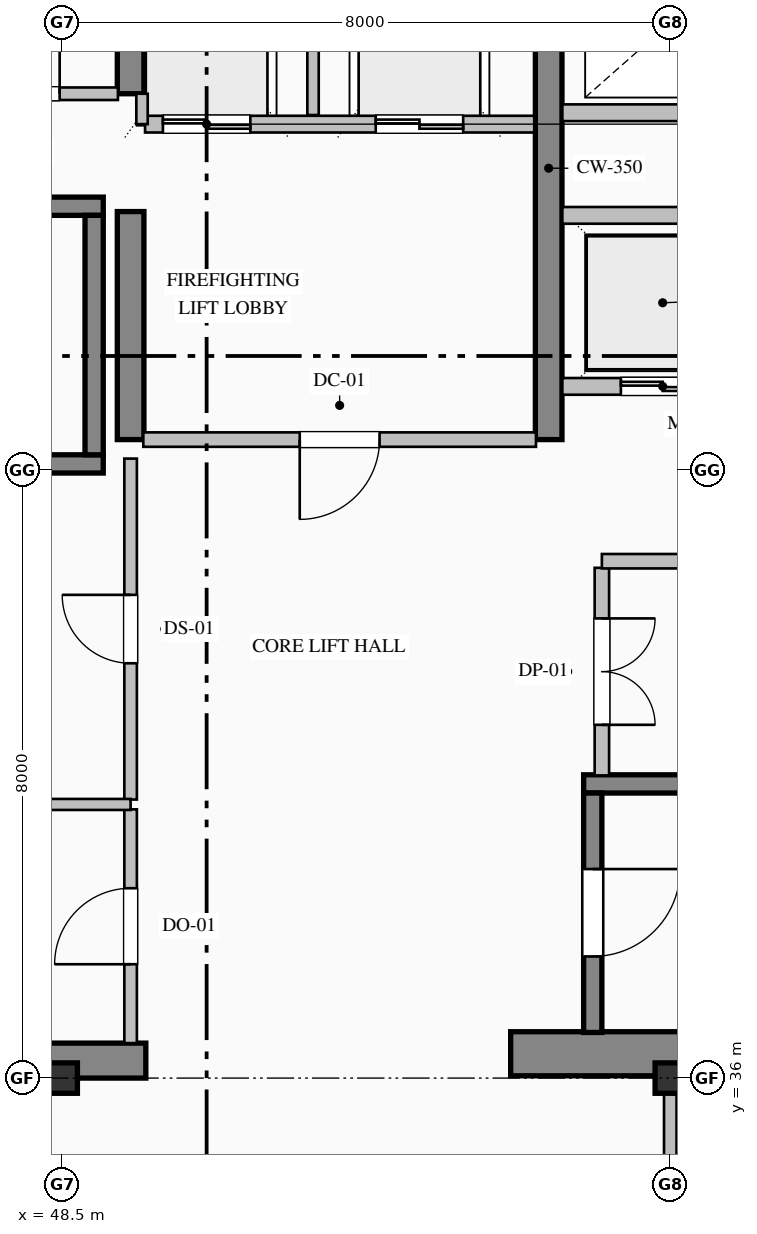
"""IFC4 building model, lengths in metres.
Left out: names, types, materials, properties, quantities, classifications, styles, units other than length and angle.
Written with IfcOpenShell. Run it as: python <this file> out.ifc"""

import sys

from ifc_helpers import new_model, si_unit, direction, frame, frame_2d, origin, origin_2d, place, context, subcontext, project, spatial, rectangle, i_section, extrude, element, fill, save


model = new_model("IFC4")
c1 = context("Model", 3, precision=1e-05, world=origin(), true_north=direction((0.0, 1.0)))
c2 = subcontext(c1, "Body", "Model", "MODEL_VIEW")
j1 = project(units=[si_unit("LENGTHUNIT", "METRE"), si_unit("PLANEANGLEUNIT", "RADIAN")], contexts=[c1])
p1 = place(None, origin())
s1 = spatial("IfcSite", under=j1, at=p1, CompositionType="ELEMENT")
p2 = place(p1, origin())
s2 = spatial("IfcBuilding", under=s1, at=p2, CompositionType="ELEMENT")
p3 = place(p2, frame((0.0, 0.0, 209.8)))
s3 = spatial("IfcBuildingStorey", under=s2, at=p3, CompositionType="ELEMENT", Elevation=209.8)
p4 = place(p3, frame((40.5, 36.23, 0.0), z_axis=(0.0, 0.0, 1.0), x_axis=(1.0, 0.0, 0.0)))
e1 = element("IfcWall", 1, at=p4, inside=s3, PredefinedType="SHEAR", context=c2, shape_type="SweptSolid", body=[
    extrude(rectangle(XDim=9.1, YDim=0.46, at=frame_2d((4.55, 0.0))), origin(), (0.0, 0.0, 1.0), 3.775),
])
p5 = place(p3, frame((54.4, 36.32, 0.0), z_axis=(0.0, 0.0, 1.0), x_axis=(1.0, 0.0, 0.0)))
e2 = element("IfcWall", 2, at=p5, inside=s3, PredefinedType="SHEAR", context=c2, shape_type="SweptSolid", body=[
    extrude(rectangle(XDim=9.6, YDim=0.58, at=frame_2d((4.8, 0.0))), origin(), (0.0, 0.0, 1.0), 4.0),
])
p6 = place(p3, frame((49.4, 44.4, 0.0), z_axis=(0.0, 0.0, 1.0), x_axis=(0.0, 1.0, 0.0)))
e3 = element("IfcWall", 3, at=p6, inside=s3, PredefinedType="SHEAR", context=c2, shape_type="SweptSolid", body=[
    extrude(rectangle(XDim=3.0, YDim=0.35, at=frame_2d((1.5, 0.0))), origin(), (0.0, 0.0, 1.0), 3.775),
])
p7 = place(p3, frame((49.4, 48.95, 0.0), z_axis=(0.0, 0.0, 1.0), x_axis=(0.0, 1.0, 0.0)))
e4 = element("IfcWall", 4, at=p7, inside=s3, PredefinedType="SHEAR", context=c2, shape_type="SweptSolid", body=[
    extrude(rectangle(XDim=2.59, YDim=0.35, at=frame_2d((1.295, 0.0))), origin(), (0.0, 0.0, 1.0), 3.775),
])
p8 = place(p3, frame((54.9, 44.4, 0.0), z_axis=(0.0, 0.0, 1.0), x_axis=(0.0, 1.0, 0.0)))
e5 = element("IfcWall", 5, at=p8, inside=s3, PredefinedType="SHEAR", context=c2, shape_type="SweptSolid", body=[
    extrude(rectangle(XDim=7.14, YDim=0.35, at=frame_2d((3.57, 0.0))), origin(), (0.0, 0.0, 1.0), 3.775),
])
for number, where, z_axis, x_axis in (
    (6, (48.5, 36.0, 0.0), (0.0, 0.0, 1.0), (1.0, 0.0, 0.0)),
    (7, (56.5, 36.0, 0.0), (0.0, 0.0, 1.0), (1.0, 0.0, 0.0)),
):
    element("IfcColumn", number, at=place(p3, frame(where, z_axis=z_axis, x_axis=x_axis)), inside=s3, PredefinedType="COLUMN", context=c2, shape_type="SweptSolid", body=[
        extrude(i_section(OverallWidth=0.4, OverallDepth=0.4, WebThickness=0.013, FlangeThickness=0.021, FilletRadius=0.022, at=origin_2d()), origin(), (0.0, 0.0, 1.0), 4.0),
    ])
for number, where, z_axis, x_axis in (
    (8, (40.96, 47.47, 0.0), (0.0, 0.0, 1.0), (1.0, 0.0, 0.0)),
    (9, (49.04, 44.08, 0.0), (0.0, 0.0, 1.0), (-1.0, 0.0, 0.0)),
):
    element("IfcWall", number, at=place(p3, frame(where, z_axis=z_axis, x_axis=x_axis)), inside=s3, PredefinedType="SOLIDWALL", context=c2, shape_type="SweptSolid", body=[
        extrude(rectangle(XDim=8.08, YDim=0.24, at=frame_2d((4.04, 0.0))), origin(), (0.0, 0.0, 1.0), 4.0),
    ])
p9 = place(p3, frame((48.92, 44.2, 0.0), z_axis=(0.0, 0.0, 1.0), x_axis=(0.0, 1.0, 0.0)))
e10 = element("IfcWall", 10, at=p9, inside=s3, PredefinedType="SOLIDWALL", context=c2, shape_type="SweptSolid", body=[
    extrude(rectangle(XDim=3.15, YDim=0.24, at=frame_2d((1.575, 0.0))), origin(), (0.0, 0.0, 1.0), 4.0),
])
p10 = place(p3, frame((55.36, 39.87, 0.0), z_axis=(0.0, 0.0, 1.0), x_axis=(1.0, 0.0, 0.0)))
e11 = element("IfcWall", 11, at=p10, inside=s3, PredefinedType="SOLIDWALL", context=c2, shape_type="SweptSolid", body=[
    extrude(rectangle(XDim=8.08, YDim=0.24, at=frame_2d((4.04, 0.0))), origin(), (0.0, 0.0, 1.0), 4.0),
])
p11 = place(p3, frame((55.48, 39.75, 0.0), z_axis=(0.0, 0.0, 1.0), x_axis=(0.0, -1.0, 0.0)))
e12 = element("IfcWall", 12, at=p11, inside=s3, PredefinedType="SOLIDWALL", context=c2, shape_type="SweptSolid", body=[
    extrude(rectangle(XDim=3.15, YDim=0.24, at=frame_2d((1.575, 0.0))), origin(), (0.0, 0.0, 1.0), 4.0),
])
p12 = place(p11, frame((1.0, 0.0, 0.0)))
e13 = element("IfcOpeningElement", 13, at=p12, cuts=e12, PredefinedType="OPENING", context=c2, shape_type="SweptSolid", body=[
    extrude(rectangle(XDim=1.15, YDim=2.2, at=frame_2d((0.575, 1.1))), frame((0.0, 0.13, 0.0), z_axis=(0.0, -1.0, 0.0), x_axis=(1.0, 0.0, 0.0)), (0.0, 0.0, 1.0), 0.26),
])
p13 = place(p3, frame((54.71, 48.55, 0.0), z_axis=(0.0, 0.0, 1.0), x_axis=(-1.0, 0.0, 0.0)))
e14 = element("IfcWall", 14, at=p13, inside=s3, PredefinedType="PARTITIONING", context=c2, shape_type="SweptSolid", body=[
    extrude(rectangle(XDim=5.12, YDim=0.22, at=frame_2d((2.56, 0.0))), origin(), (0.0, 0.0, 1.0), 3.775),
])
p14 = place(p13, frame((3.735, 0.0, 0.0)))
e15 = element("IfcOpeningElement", 15, at=p14, cuts=e14, PredefinedType="OPENING", context=c2, shape_type="SweptSolid", body=[
    extrude(rectangle(XDim=1.15, YDim=2.2, at=frame_2d((0.575, 1.1))), frame((0.0, 0.12, 0.0), z_axis=(0.0, -1.0, 0.0), x_axis=(1.0, 0.0, 0.0)), (0.0, 0.0, 1.0), 0.24),
])
p15 = place(p13, frame((0.935, 0.0, 0.0)))
e16 = element("IfcOpeningElement", 16, at=p15, cuts=e14, PredefinedType="OPENING", context=c2, shape_type="SweptSolid", body=[
    extrude(rectangle(XDim=1.15, YDim=2.2, at=frame_2d((0.575, 1.1))), frame((0.0, 0.12, 0.0), z_axis=(0.0, -1.0, 0.0), x_axis=(1.0, 0.0, 0.0)), (0.0, 0.0, 1.0), 0.24),
])
p16 = place(p3, frame((51.8, 48.67, 0.0), z_axis=(0.0, 0.0, 1.0), x_axis=(0.0, 1.0, 0.0)))
e17 = element("IfcWall", 17, at=p16, inside=s3, PredefinedType="PARTITIONING", context=c2, shape_type="SweptSolid", body=[
    extrude(rectangle(XDim=2.87, YDim=0.15, at=frame_2d((1.435, 0.0))), origin(), (0.0, 0.0, 1.0), 3.775),
])
p17 = place(p3, frame((49.55, 48.55, 0.0), z_axis=(0.0, 0.0, 1.0), x_axis=(0.0, 1.0, 0.0)))
e18 = element("IfcWall", 18, at=p17, inside=s3, PredefinedType="PARTITIONING", context=c2, shape_type="SweptSolid", body=[
    extrude(rectangle(XDim=0.4, YDim=0.15, at=frame_2d((0.2, 0.0))), origin(), (0.0, 0.0, 1.0), 3.775),
])
p18 = place(p3, frame((63.32, 45.1, 0.0), z_axis=(0.0, 0.0, 1.0), x_axis=(-1.0, 0.0, 0.0)))
e19 = element("IfcWall", 19, at=p18, inside=s3, PredefinedType="PARTITIONING", context=c2, shape_type="SweptSolid", body=[
    extrude(rectangle(XDim=8.24, YDim=0.22, at=frame_2d((4.12, 0.0))), origin(), (0.0, 0.0, 1.0), 3.775),
])
p19 = place(p18, frame((6.37, 0.0, 0.0)))
e20 = element("IfcOpeningElement", 20, at=p19, cuts=e19, PredefinedType="OPENING", context=c2, shape_type="SweptSolid", body=[
    extrude(rectangle(XDim=1.1, YDim=2.2, at=frame_2d((0.55, 1.1))), frame((0.0, 0.12, 0.0), z_axis=(0.0, -1.0, 0.0), x_axis=(1.0, 0.0, 0.0)), (0.0, 0.0, 1.0), 0.24),
])
p20 = place(p18, frame((3.57, 0.0, 0.0)))
e21 = element("IfcOpeningElement", 21, at=p20, cuts=e19, PredefinedType="OPENING", context=c2, shape_type="SweptSolid", body=[
    extrude(rectangle(XDim=1.1, YDim=2.2, at=frame_2d((0.55, 1.1))), frame((0.0, 0.12, 0.0), z_axis=(0.0, -1.0, 0.0), x_axis=(1.0, 0.0, 0.0)), (0.0, 0.0, 1.0), 0.24),
])
p21 = place(p18, frame((0.77, 0.0, 0.0)))
e22 = element("IfcOpeningElement", 22, at=p21, cuts=e19, PredefinedType="OPENING", context=c2, shape_type="SweptSolid", body=[
    extrude(rectangle(XDim=1.1, YDim=2.2, at=frame_2d((0.55, 1.1))), frame((0.0, 0.12, 0.0), z_axis=(0.0, -1.0, 0.0), x_axis=(1.0, 0.0, 0.0)), (0.0, 0.0, 1.0), 0.24),
])
for number, where, z_axis, x_axis in (
    (23, (55.08, 47.35, 0.0), (0.0, 0.0, 1.0), (1.0, 0.0, 0.0)),
    (24, (63.32, 48.7, 0.0), (0.0, 0.0, 1.0), (-1.0, 0.0, 0.0)),
):
    element("IfcWall", number, at=place(p3, frame(where, z_axis=z_axis, x_axis=x_axis)), inside=s3, PredefinedType="PARTITIONING", context=c2, shape_type="SweptSolid", body=[
        extrude(rectangle(XDim=8.24, YDim=0.22, at=frame_2d((4.12, 0.0))), origin(), (0.0, 0.0, 1.0), 3.775),
    ])
p22 = place(p3, frame((46.8, 48.95, 0.0), z_axis=(0.0, 0.0, 1.0), x_axis=(1.0, 0.0, 0.0)))
e25 = element("IfcWall", 25, at=p22, inside=s3, PredefinedType="PARTITIONING", context=c2, shape_type="SweptSolid", body=[
    extrude(rectangle(XDim=2.433, YDim=0.165, at=frame_2d((1.216, 0.0))), origin(), (0.0, 0.0, 1.0), 3.775),
])
p23 = place(p22, frame((0.767, 0.0, 0.0)))
e26 = element("IfcOpeningElement", 26, at=p23, cuts=e25, PredefinedType="OPENING", context=c2, shape_type="SweptSolid", body=[
    extrude(rectangle(XDim=0.9, YDim=2.15, at=frame_2d((0.45, 1.075))), frame((0.0, 0.093, 0.0), z_axis=(0.0, -1.0, 0.0), x_axis=(1.0, 0.0, 0.0)), (0.0, 0.0, 1.0), 0.185),
])
p24 = place(p3, frame((54.733, 44.4, 0.0), z_axis=(0.0, 0.0, 1.0), x_axis=(-1.0, 0.0, 0.0)))
e27 = element("IfcWall", 27, at=p24, inside=s3, PredefinedType="PARTITIONING", context=c2, shape_type="SweptSolid", body=[
    extrude(rectangle(XDim=5.166, YDim=0.19, at=frame_2d((2.583, 0.0))), origin(), (0.0, 0.0, 1.0), 3.775),
])
p25 = place(p24, frame((2.058, 0.0, 0.0)))
e28 = element("IfcOpeningElement", 28, at=p25, cuts=e27, PredefinedType="OPENING", context=c2, shape_type="SweptSolid", body=[
    extrude(rectangle(XDim=1.05, YDim=2.15, at=frame_2d((0.525, 1.075))), frame((0.0, 0.105, 0.0), z_axis=(0.0, -1.0, 0.0), x_axis=(1.0, 0.0, 0.0)), (0.0, 0.0, 1.0), 0.21),
])
p26 = place(p3, frame((49.4, 36.46, 0.0), z_axis=(0.0, 0.0, 1.0), x_axis=(0.0, 1.0, 0.0)))
e29 = element("IfcWall", 29, at=p26, inside=s3, PredefinedType="PARTITIONING", context=c2, shape_type="SweptSolid", body=[
    extrude(rectangle(XDim=3.075, YDim=0.165, at=frame_2d((1.538, 0.0))), origin(), (0.0, 0.0, 1.0), 3.017),
])
p27 = place(p26, frame((1.038, 0.0, 0.0)))
e30 = element("IfcOpeningElement", 30, at=p27, cuts=e29, PredefinedType="OPENING", context=c2, shape_type="SweptSolid", body=[
    extrude(rectangle(XDim=1.0, YDim=2.15, at=frame_2d((0.5, 1.075))), frame((0.0, 0.093, 0.0), z_axis=(0.0, -1.0, 0.0), x_axis=(1.0, 0.0, 0.0)), (0.0, 0.0, 1.0), 0.185),
])
p28 = place(p3, frame((49.4, 39.665, 0.0), z_axis=(0.0, 0.0, 1.0), x_axis=(0.0, 1.0, 0.0)))
e31 = element("IfcWall", 31, at=p28, inside=s3, PredefinedType="PARTITIONING", context=c2, shape_type="SweptSolid", body=[
    extrude(rectangle(XDim=4.485, YDim=0.165, at=frame_2d((2.243, 0.0))), origin(), (0.0, 0.0, 1.0), 3.017),
])
p29 = place(p28, frame((1.793, 0.0, 0.0)))
e32 = element("IfcOpeningElement", 32, at=p29, cuts=e31, PredefinedType="OPENING", context=c2, shape_type="SweptSolid", body=[
    extrude(rectangle(XDim=0.9, YDim=2.15, at=frame_2d((0.45, 1.075))), frame((0.0, 0.093, 0.0), z_axis=(0.0, -1.0, 0.0), x_axis=(1.0, 0.0, 0.0)), (0.0, 0.0, 1.0), 0.185),
])
p30 = place(p3, frame((55.6, 42.713, 0.0), z_axis=(0.0, 0.0, 1.0), x_axis=(0.0, -1.0, 0.0)))
e33 = element("IfcWall", 33, at=p30, inside=s3, PredefinedType="PARTITIONING", context=c2, shape_type="SweptSolid", body=[
    extrude(rectangle(XDim=2.731, YDim=0.19, at=frame_2d((1.365, 0.0))), origin(), (0.0, 0.0, 1.0), 3.775),
])
p31 = place(p30, frame((0.666, 0.0, 0.0)))
e34 = element("IfcOpeningElement", 34, at=p31, cuts=e33, PredefinedType="OPENING", context=c2, shape_type="SweptSolid", body=[
    extrude(rectangle(XDim=1.4, YDim=2.25, at=frame_2d((0.7, 1.125))), frame((0.0, 0.105, 0.0), z_axis=(0.0, -1.0, 0.0), x_axis=(1.0, 0.0, 0.0)), (0.0, 0.0, 1.0), 0.21),
])
p32 = place(p3, frame((40.96, 39.6, 0.0), z_axis=(0.0, 0.0, 1.0), x_axis=(1.0, 0.0, 0.0)))
e35 = element("IfcWall", 35, at=p32, inside=s3, PredefinedType="PARTITIONING", context=c2, shape_type="SweptSolid", body=[
    extrude(rectangle(XDim=8.44, YDim=0.145, at=frame_2d((4.22, 0.0))), origin(), (0.0, 0.0, 1.0), 3.775),
])
p33 = place(p3, frame((58.2, 42.8, 0.0), z_axis=(0.0, 0.0, 1.0), x_axis=(-1.0, 0.0, 0.0)))
e36 = element("IfcWall", 36, at=p33, inside=s3, PredefinedType="PARTITIONING", context=c2, shape_type="SweptSolid", body=[
    extrude(rectangle(XDim=2.6, YDim=0.19, at=frame_2d((1.3, 0.0))), origin(), (0.0, 0.0, 1.0), 3.775),
])
p34 = place(p3, frame((56.5, 36.0, 0.0), z_axis=(0.0, 0.0, 1.0), x_axis=(0.0, -1.0, 0.0)))
e37 = element("IfcWall", 37, at=p34, inside=s3, PredefinedType="PARTITIONING", context=c2, shape_type="SweptSolid", body=[
    extrude(rectangle(XDim=4.135, YDim=0.165, at=frame_2d((2.068, 0.0))), origin(), (0.0, 0.0, 1.0), 3.179),
])
p35 = place(p34, frame((1.568, 0.0, 0.0)))
e38 = element("IfcOpeningElement", 38, at=p35, cuts=e37, PredefinedType="OPENING", context=c2, shape_type="SweptSolid", body=[
    extrude(rectangle(XDim=1.0, YDim=2.15, at=frame_2d((0.5, 1.075))), frame((0.0, 0.093, 0.0), z_axis=(0.0, -1.0, 0.0), x_axis=(1.0, 0.0, 0.0)), (0.0, 0.0, 1.0), 0.185),
])
p36 = place(p12, origin())
e39 = element("IfcDoor", 39, at=p36, inside=s3, OperationType="SINGLE_SWING_LEFT", PredefinedType="DOOR", context=c2, shape_type="SweptSolid", body=[
    extrude(rectangle(XDim=1.15, YDim=2.2, at=frame_2d((0.575, 1.1))), frame((0.0, 0.025, 0.0), z_axis=(0.0, -1.0, 0.0), x_axis=(1.0, 0.0, 0.0)), (0.0, 0.0, 1.0), 0.05),
])
fill(e13, e39)
p37 = place(p14, origin())
e40 = element("IfcDoor", 40, at=p37, inside=s3, OperationType="DOUBLE_DOOR_SLIDING", PredefinedType="DOOR", context=c2, shape_type="SweptSolid", body=[
    extrude(rectangle(XDim=1.15, YDim=2.2, at=frame_2d((0.575, 1.1))), frame((0.0, 0.025, 0.0), z_axis=(0.0, -1.0, 0.0), x_axis=(1.0, 0.0, 0.0)), (0.0, 0.0, 1.0), 0.05),
])
fill(e15, e40)
p38 = place(p15, origin())
e41 = element("IfcDoor", 41, at=p38, inside=s3, OperationType="DOUBLE_DOOR_SLIDING", PredefinedType="DOOR", context=c2, shape_type="SweptSolid", body=[
    extrude(rectangle(XDim=1.15, YDim=2.2, at=frame_2d((0.575, 1.1))), frame((0.0, 0.025, 0.0), z_axis=(0.0, -1.0, 0.0), x_axis=(1.0, 0.0, 0.0)), (0.0, 0.0, 1.0), 0.05),
])
fill(e16, e41)
p39 = place(p19, origin())
e42 = element("IfcDoor", 42, at=p39, inside=s3, OperationType="DOUBLE_DOOR_SLIDING", PredefinedType="DOOR", context=c2, shape_type="SweptSolid", body=[
    extrude(rectangle(XDim=1.1, YDim=2.2, at=frame_2d((0.55, 1.1))), frame((0.0, 0.025, 0.0), z_axis=(0.0, -1.0, 0.0), x_axis=(1.0, 0.0, 0.0)), (0.0, 0.0, 1.0), 0.05),
])
fill(e20, e42)
p40 = place(p25, origin())
e43 = element("IfcDoor", 43, at=p40, inside=s3, OperationType="SINGLE_SWING_RIGHT", PredefinedType="DOOR", context=c2, shape_type="SweptSolid", body=[
    extrude(rectangle(XDim=1.05, YDim=2.15, at=frame_2d((0.525, 1.075))), frame((0.0, 0.025, 0.0), z_axis=(0.0, -1.0, 0.0), x_axis=(1.0, 0.0, 0.0)), (0.0, 0.0, 1.0), 0.05),
])
fill(e28, e43)
p41 = place(p27, origin())
e44 = element("IfcDoor", 44, at=p41, inside=s3, OperationType="SINGLE_SWING_LEFT", PredefinedType="DOOR", context=c2, shape_type="SweptSolid", body=[
    extrude(rectangle(XDim=1.0, YDim=2.15, at=frame_2d((0.5, 1.075))), frame((0.0, 0.025, 0.0), z_axis=(0.0, -1.0, 0.0), x_axis=(1.0, 0.0, 0.0)), (0.0, 0.0, 1.0), 0.05),
])
fill(e30, e44)
p42 = place(p29, origin())
e45 = element("IfcDoor", 45, at=p42, inside=s3, OperationType="SINGLE_SWING_RIGHT", PredefinedType="DOOR", context=c2, shape_type="SweptSolid", body=[
    extrude(rectangle(XDim=0.9, YDim=2.15, at=frame_2d((0.45, 1.075))), frame((0.0, 0.025, 0.0), z_axis=(0.0, -1.0, 0.0), x_axis=(1.0, 0.0, 0.0)), (0.0, 0.0, 1.0), 0.05),
])
fill(e32, e45)
p43 = place(p23, origin())
e46 = element("IfcDoor", 46, at=p43, inside=s3, OperationType="SINGLE_SWING_RIGHT", PredefinedType="DOOR", context=c2, shape_type="SweptSolid", body=[
    extrude(rectangle(XDim=0.9, YDim=2.15, at=frame_2d((0.45, 1.075))), frame((0.0, 0.025, 0.0), z_axis=(0.0, -1.0, 0.0), x_axis=(1.0, 0.0, 0.0)), (0.0, 0.0, 1.0), 0.05),
])
fill(e26, e46)
p44 = place(p31, origin())
e47 = element("IfcDoor", 47, at=p44, inside=s3, OperationType="DOUBLE_DOOR_SINGLE_SWING", PredefinedType="DOOR", context=c2, shape_type="SweptSolid", body=[
    extrude(rectangle(XDim=1.4, YDim=2.25, at=frame_2d((0.7, 1.125))), frame((0.0, 0.025, 0.0), z_axis=(0.0, -1.0, 0.0), x_axis=(1.0, 0.0, 0.0)), (0.0, 0.0, 1.0), 0.05),
])
fill(e34, e47)
save(model, sys.argv[1])
